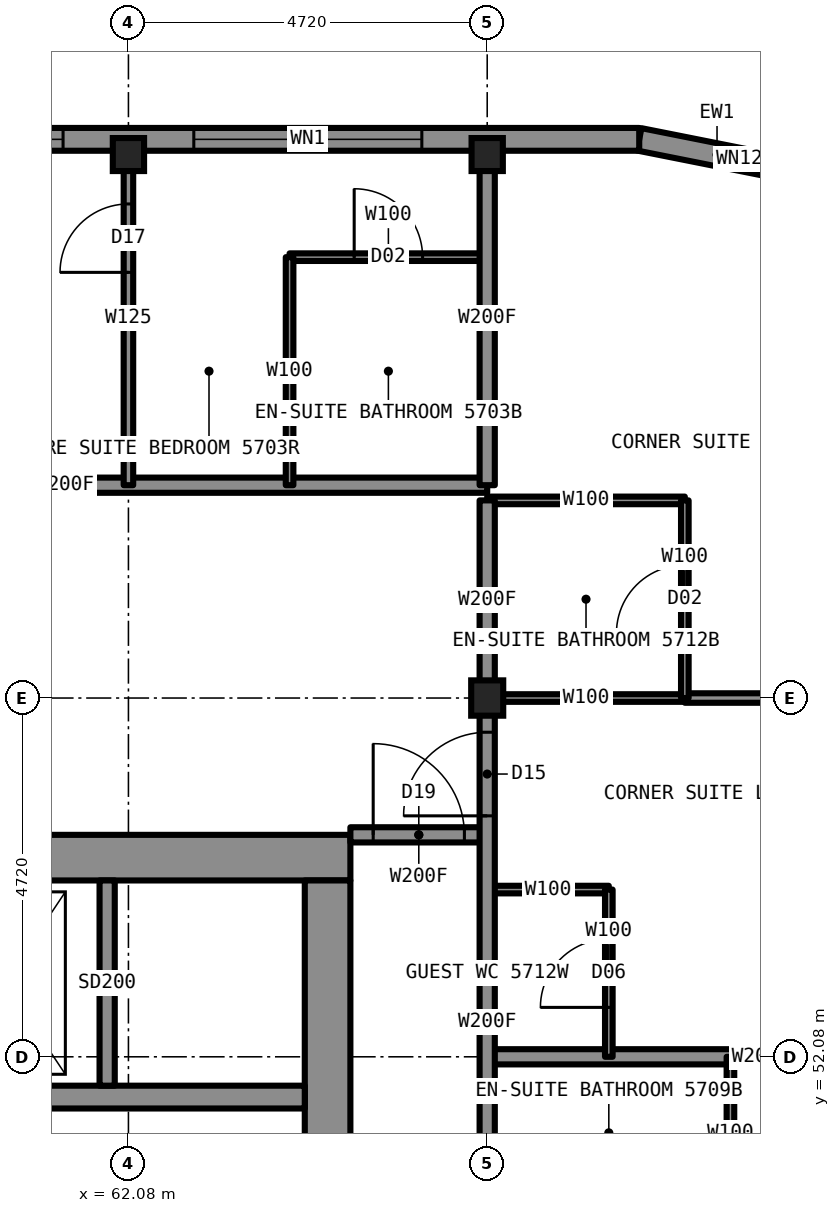
"""IFC4 building model, lengths in metres.
Left out: names, types, materials, properties, quantities, classifications, styles, units other than length and angle.
Written with IfcOpenShell. Run it as: python <this file> out.ifc"""

import sys

from ifc_helpers import new_model, si_unit, direction, frame, frame_2d, origin, origin_2d, place, context, subcontext, project, spatial, rectangle, i_section, extrude, element, fill, save


model = new_model("IFC4")
c1 = context("Model", 3, precision=1e-05, world=origin(), true_north=direction((0.0, 1.0)))
c2 = subcontext(c1, "Body", "Model", "MODEL_VIEW")
j1 = project(units=[si_unit("LENGTHUNIT", "METRE"), si_unit("PLANEANGLEUNIT", "RADIAN")], contexts=[c1])
p1 = place(None, origin())
s1 = spatial("IfcSite", under=j1, at=p1, CompositionType="ELEMENT")
p2 = place(p1, origin())
s2 = spatial("IfcBuilding", under=s1, at=p2, CompositionType="ELEMENT")
p3 = place(p2, frame((0.0, 0.0, 203.8)))
s3 = spatial("IfcBuildingStorey", under=s2, at=p3, CompositionType="ELEMENT", Elevation=203.8)
for number, where, z_axis, x_axis in (
    (1, (62.08, 63.95, 0.0), (0.0, 0.0, 1.0), (1.0, 0.0, 0.0)),
    (2, (66.8, 63.95, 0.0), (0.0, 0.0, 1.0), (1.0, 0.0, 0.0)),
):
    element("IfcColumn", number, at=place(p3, frame(where, z_axis=z_axis, x_axis=x_axis)), inside=s3, PredefinedType="COLUMN", context=c2, shape_type="SweptSolid", body=[
        extrude(i_section(OverallWidth=0.411, OverallDepth=0.434, WebThickness=0.036, FlangeThickness=0.057, at=origin_2d()), origin(), (0.0, 0.0, 1.0), 3.5),
    ])
p4 = place(p3, frame((66.8, 56.8, 0.0), z_axis=(0.0, 0.0, 1.0), x_axis=(1.0, 0.0, 0.0)))
e3 = element("IfcColumn", 3, at=p4, inside=s3, PredefinedType="COLUMN", context=c2, shape_type="SweptSolid", body=[
    extrude(i_section(OverallWidth=0.422, OverallDepth=0.465, WebThickness=0.045, FlangeThickness=0.073, at=origin_2d()), origin(), (0.0, 0.0, 1.0), 3.5),
])
p5 = place(p3, frame((45.0, 54.7, 0.0), z_axis=(0.0, 0.0, 1.0), x_axis=(1.0, 0.0, 0.0)))
e4 = element("IfcWall", 4, at=p5, inside=s3, PredefinedType="SHEAR", context=c2, shape_type="SweptSolid", body=[
    extrude(rectangle(XDim=20.0, YDim=0.6, at=frame_2d((10.0, 0.0))), origin(), (0.0, 0.0, 1.0), 3.5),
])
p6 = place(p3, frame((64.7, 35.6, 0.0), z_axis=(0.0, 0.0, 1.0), x_axis=(0.0, 1.0, 0.0)))
e5 = element("IfcWall", 5, at=p6, inside=s3, PredefinedType="SHEAR", context=c2, shape_type="SweptSolid", body=[
    extrude(rectangle(XDim=18.8, YDim=0.6, at=frame_2d((9.4, 0.0))), origin(), (0.0, 0.0, 1.0), 3.5),
])
p7 = place(p6, frame((13.4, 0.0, 0.0)))
e6 = element("IfcOpeningElement", 6, at=p7, cuts=e5, PredefinedType="OPENING", context=c2, shape_type="SweptSolid", body=[
    extrude(rectangle(XDim=1.8, YDim=2.2, at=frame_2d((0.9, 1.1))), frame((0.0, 0.31, 0.0), z_axis=(0.0, -1.0, 0.0), x_axis=(1.0, 0.0, 0.0)), (0.0, 0.0, 1.0), 0.62),
])
p8 = place(p6, frame((3.6, 0.0, 0.0)))
e7 = element("IfcOpeningElement", 7, at=p8, cuts=e5, PredefinedType="OPENING", context=c2, shape_type="SweptSolid", body=[
    extrude(rectangle(XDim=1.8, YDim=2.2, at=frame_2d((0.9, 1.1))), frame((0.0, 0.31, 0.0), z_axis=(0.0, -1.0, 0.0), x_axis=(1.0, 0.0, 0.0)), (0.0, 0.0, 1.0), 0.62),
])
p9 = place(p3, frame((45.6, 51.55, 0.0), z_axis=(0.0, 0.0, 1.0), x_axis=(1.0, 0.0, 0.0)))
e8 = element("IfcWall", 8, at=p9, inside=s3, PredefinedType="SHEAR", context=c2, shape_type="SweptSolid", body=[
    extrude(rectangle(XDim=18.8, YDim=0.3, at=frame_2d((9.4, 0.0))), origin(), (0.0, 0.0, 1.0), 3.5),
])
p10 = place(p9, frame((4.8, 0.0, 0.0)))
e9 = element("IfcOpeningElement", 9, at=p10, cuts=e8, PredefinedType="OPENING", context=c2, shape_type="SweptSolid", body=[
    extrude(rectangle(XDim=1.0, YDim=2.1, at=frame_2d((0.5, 1.05))), frame((0.0, 0.16, 0.0), z_axis=(0.0, -1.0, 0.0), x_axis=(1.0, 0.0, 0.0)), (0.0, 0.0, 1.0), 0.32),
])
p11 = place(p9, frame((11.6, 0.0, 0.0)))
e10 = element("IfcOpeningElement", 10, at=p11, cuts=e8, PredefinedType="OPENING", context=c2, shape_type="SweptSolid", body=[
    extrude(rectangle(XDim=1.1, YDim=2.2, at=frame_2d((0.55, 1.1))), frame((0.0, 0.16, 0.0), z_axis=(0.0, -1.0, 0.0), x_axis=(1.0, 0.0, 0.0)), (0.0, 0.0, 1.0), 0.32),
])
p12 = place(p9, frame((14.3, 0.0, 0.0)))
e11 = element("IfcOpeningElement", 11, at=p12, cuts=e8, PredefinedType="OPENING", context=c2, shape_type="SweptSolid", body=[
    extrude(rectangle(XDim=1.1, YDim=2.2, at=frame_2d((0.55, 1.1))), frame((0.0, 0.16, 0.0), z_axis=(0.0, -1.0, 0.0), x_axis=(1.0, 0.0, 0.0)), (0.0, 0.0, 1.0), 0.32),
])
p13 = place(p3, frame((65.0, 55.0, 0.0), z_axis=(0.0, 0.0, 1.0), x_axis=(1.0, 0.0, 0.0)))
e12 = element("IfcWall", 12, at=p13, inside=s3, PredefinedType="PARTITIONING", context=c2, shape_type="SweptSolid", body=[
    extrude(rectangle(XDim=1.8, YDim=0.2, at=frame_2d((0.9, 0.0))), origin(), (0.0, 0.0, 1.0), 3.33),
])
p14 = place(p13, frame((0.3, 0.0, 0.0)))
e13 = element("IfcOpeningElement", 13, at=p14, cuts=e12, PredefinedType="OPENING", context=c2, shape_type="SweptSolid", body=[
    extrude(rectangle(XDim=1.2, YDim=2.2, at=frame_2d((0.6, 1.1))), frame((0.0, 0.11, 0.0), z_axis=(0.0, -1.0, 0.0), x_axis=(1.0, 0.0, 0.0)), (0.0, 0.0, 1.0), 0.22),
])
p15 = place(p3, frame((66.8, 56.8, 0.0), z_axis=(0.0, 0.0, 1.0), x_axis=(1.0, 0.0, 0.0)))
e14 = element("IfcWall", 14, at=p15, inside=s3, PredefinedType="PARTITIONING", context=c2, shape_type="SweptSolid", body=[
    extrude(rectangle(XDim=2.6, YDim=0.1, at=frame_2d((1.3, 0.0))), origin(), (0.0, 0.0, 1.0), 2.573),
])
p16 = place(p3, frame((69.4, 56.8, 0.0), z_axis=(0.0, 0.0, 1.0), x_axis=(1.0, 0.0, 0.0)))
e15 = element("IfcWall", 15, at=p16, inside=s3, PredefinedType="PARTITIONING", context=c2, shape_type="SweptSolid", body=[
    extrude(rectangle(XDim=4.6, YDim=0.125, at=frame_2d((2.3, 0.0))), origin(), (0.0, 0.0, 1.0), 2.573),
])
p17 = place(p16, frame((1.15, 0.0, 0.0)))
e16 = element("IfcOpeningElement", 16, at=p17, cuts=e15, PredefinedType="OPENING", context=c2, shape_type="SweptSolid", body=[
    extrude(rectangle(XDim=0.9, YDim=2.2, at=frame_2d((0.45, 1.1))), frame((0.0, 0.073, 0.0), z_axis=(0.0, -1.0, 0.0), x_axis=(1.0, 0.0, 0.0)), (0.0, 0.0, 1.0), 0.145),
])
p18 = place(p3, frame((66.8, 59.4, 0.0), z_axis=(0.0, 0.0, 1.0), x_axis=(1.0, 0.0, 0.0)))
e17 = element("IfcWall", 17, at=p18, inside=s3, PredefinedType="PARTITIONING", context=c2, shape_type="SweptSolid", body=[
    extrude(rectangle(XDim=2.6, YDim=0.1, at=frame_2d((1.3, 0.0))), origin(), (0.0, 0.0, 1.0), 3.33),
])
p19 = place(p3, frame((43.2, 59.6, 0.0), z_axis=(0.0, 0.0, 1.0), x_axis=(1.0, 0.0, 0.0)))
e18 = element("IfcWall", 18, at=p19, inside=s3, PredefinedType="PARTITIONING", context=c2, shape_type="SweptSolid", body=[
    extrude(rectangle(XDim=23.6, YDim=0.2, at=frame_2d((11.8, 0.0))), origin(), (0.0, 0.0, 1.0), 3.33),
])
p20 = place(p19, frame((1.46, 0.0, 0.0)))
e19 = element("IfcOpeningElement", 19, at=p20, cuts=e18, PredefinedType="OPENING", context=c2, shape_type="SweptSolid", body=[
    extrude(rectangle(XDim=1.0, YDim=2.2, at=frame_2d((0.5, 1.1))), frame((0.0, 0.11, 0.0), z_axis=(0.0, -1.0, 0.0), x_axis=(1.0, 0.0, 0.0)), (0.0, 0.0, 1.0), 0.22),
])
p21 = place(p19, frame((6.18, 0.0, 0.0)))
e20 = element("IfcOpeningElement", 20, at=p21, cuts=e18, PredefinedType="OPENING", context=c2, shape_type="SweptSolid", body=[
    extrude(rectangle(XDim=1.0, YDim=2.2, at=frame_2d((0.5, 1.1))), frame((0.0, 0.11, 0.0), z_axis=(0.0, -1.0, 0.0), x_axis=(1.0, 0.0, 0.0)), (0.0, 0.0, 1.0), 0.22),
])
p22 = place(p19, frame((11.29, 0.0, 0.0)))
e21 = element("IfcOpeningElement", 21, at=p22, cuts=e18, PredefinedType="OPENING", context=c2, shape_type="SweptSolid", body=[
    extrude(rectangle(XDim=1.1, YDim=2.2, at=frame_2d((0.55, 1.1))), frame((0.0, 0.11, 0.0), z_axis=(0.0, -1.0, 0.0), x_axis=(1.0, 0.0, 0.0)), (0.0, 0.0, 1.0), 0.22),
])
p23 = place(p3, frame((64.2, 62.6, 0.0), z_axis=(0.0, 0.0, 1.0), x_axis=(1.0, 0.0, 0.0)))
e22 = element("IfcWall", 22, at=p23, inside=s3, PredefinedType="PARTITIONING", context=c2, shape_type="SweptSolid", body=[
    extrude(rectangle(XDim=2.6, YDim=0.1, at=frame_2d((1.3, 0.0))), origin(), (0.0, 0.0, 1.0), 3.33),
])
p24 = place(p23, frame((0.85, 0.0, 0.0)))
e23 = element("IfcOpeningElement", 23, at=p24, cuts=e22, PredefinedType="OPENING", context=c2, shape_type="SweptSolid", body=[
    extrude(rectangle(XDim=0.9, YDim=2.1, at=frame_2d((0.45, 1.05))), frame((0.0, 0.06, 0.0), z_axis=(0.0, -1.0, 0.0), x_axis=(1.0, 0.0, 0.0)), (0.0, 0.0, 1.0), 0.12),
])
p25 = place(p3, frame((66.8, 52.08, 0.0), z_axis=(0.0, 0.0, 1.0), x_axis=(1.0, 0.0, 0.0)))
e24 = element("IfcWall", 24, at=p25, inside=s3, PredefinedType="PARTITIONING", context=c2, shape_type="SweptSolid", body=[
    extrude(rectangle(XDim=7.2, YDim=0.2, at=frame_2d((3.6, 0.0))), origin(), (0.0, 0.0, 1.0), 2.573),
])
p26 = place(p3, frame((66.8, 54.28, 0.0), z_axis=(0.0, 0.0, 1.0), x_axis=(1.0, 0.0, 0.0)))
e25 = element("IfcWall", 25, at=p26, inside=s3, PredefinedType="PARTITIONING", context=c2, shape_type="SweptSolid", body=[
    extrude(rectangle(XDim=1.6, YDim=0.1, at=frame_2d((0.8, 0.0))), origin(), (0.0, 0.0, 1.0), 3.33),
])
p27 = place(p3, frame((66.8, 33.2, 0.0), z_axis=(0.0, 0.0, 1.0), x_axis=(0.0, 1.0, 0.0)))
e26 = element("IfcWall", 26, at=p27, inside=s3, PredefinedType="PARTITIONING", context=c2, shape_type="SweptSolid", body=[
    extrude(rectangle(XDim=23.58, YDim=0.2, at=frame_2d((11.79, 0.0))), origin(), (0.0, 0.0, 1.0), 3.33),
])
p28 = place(p27, frame((6.98, 0.0, 0.0)))
e27 = element("IfcOpeningElement", 27, at=p28, cuts=e26, PredefinedType="OPENING", context=c2, shape_type="SweptSolid", body=[
    extrude(rectangle(XDim=1.0, YDim=2.2, at=frame_2d((0.5, 1.1))), frame((0.0, 0.11, 0.0), z_axis=(0.0, -1.0, 0.0), x_axis=(1.0, 0.0, 0.0)), (0.0, 0.0, 1.0), 0.22),
])
p29 = place(p27, frame((11.7, 0.0, 0.0)))
e28 = element("IfcOpeningElement", 28, at=p29, cuts=e26, PredefinedType="OPENING", context=c2, shape_type="SweptSolid", body=[
    extrude(rectangle(XDim=1.0, YDim=2.2, at=frame_2d((0.5, 1.1))), frame((0.0, 0.11, 0.0), z_axis=(0.0, -1.0, 0.0), x_axis=(1.0, 0.0, 0.0)), (0.0, 0.0, 1.0), 0.22),
])
p30 = place(p27, frame((15.62, 0.0, 0.0)))
e29 = element("IfcOpeningElement", 29, at=p30, cuts=e26, PredefinedType="OPENING", context=c2, shape_type="SweptSolid", body=[
    extrude(rectangle(XDim=1.0, YDim=2.2, at=frame_2d((0.5, 1.1))), frame((0.0, 0.11, 0.0), z_axis=(0.0, -1.0, 0.0), x_axis=(1.0, 0.0, 0.0)), (0.0, 0.0, 1.0), 0.22),
])
p31 = place(p27, frame((22.05, 0.0, 0.0)))
e30 = element("IfcOpeningElement", 30, at=p31, cuts=e26, PredefinedType="OPENING", context=c2, shape_type="SweptSolid", body=[
    extrude(rectangle(XDim=1.1, YDim=2.2, at=frame_2d((0.55, 1.1))), frame((0.0, 0.11, 0.0), z_axis=(0.0, -1.0, 0.0), x_axis=(1.0, 0.0, 0.0)), (0.0, 0.0, 1.0), 0.22),
])
p32 = place(p27, frame((0.65, 0.0, 0.0)))
e31 = element("IfcOpeningElement", 31, at=p32, cuts=e26, PredefinedType="OPENING", context=c2, shape_type="SweptSolid", body=[
    extrude(rectangle(XDim=1.1, YDim=2.2, at=frame_2d((0.55, 1.1))), frame((0.0, 0.11, 0.0), z_axis=(0.0, -1.0, 0.0), x_axis=(1.0, 0.0, 0.0)), (0.0, 0.0, 1.0), 0.22),
])
p33 = place(p3, frame((66.8, 59.6, 0.0), z_axis=(0.0, 0.0, 1.0), x_axis=(0.0, 1.0, 0.0)))
e32 = element("IfcWall", 32, at=p33, inside=s3, PredefinedType="PARTITIONING", context=c2, shape_type="SweptSolid", body=[
    extrude(rectangle(XDim=4.4, YDim=0.2, at=frame_2d((2.2, 0.0))), origin(), (0.0, 0.0, 1.0), 2.573),
])
p34 = place(p3, frame((68.4, 52.08, 0.0), z_axis=(0.0, 0.0, 1.0), x_axis=(0.0, 1.0, 0.0)))
e33 = element("IfcWall", 33, at=p34, inside=s3, PredefinedType="PARTITIONING", context=c2, shape_type="SweptSolid", body=[
    extrude(rectangle(XDim=2.2, YDim=0.1, at=frame_2d((1.1, 0.0))), origin(), (0.0, 0.0, 1.0), 3.33),
])
p35 = place(p34, frame((0.65, 0.0, 0.0)))
e34 = element("IfcOpeningElement", 34, at=p35, cuts=e33, PredefinedType="OPENING", context=c2, shape_type="SweptSolid", body=[
    extrude(rectangle(XDim=0.9, YDim=2.1, at=frame_2d((0.45, 1.05))), frame((0.0, 0.06, 0.0), z_axis=(0.0, -1.0, 0.0), x_axis=(1.0, 0.0, 0.0)), (0.0, 0.0, 1.0), 0.12),
])
p36 = place(p3, frame((69.4, 56.8, 0.0), z_axis=(0.0, 0.0, 1.0), x_axis=(0.0, 1.0, 0.0)))
e35 = element("IfcWall", 35, at=p36, inside=s3, PredefinedType="PARTITIONING", context=c2, shape_type="SweptSolid", body=[
    extrude(rectangle(XDim=2.6, YDim=0.1, at=frame_2d((1.3, 0.0))), origin(), (0.0, 0.0, 1.0), 3.33),
])
p37 = place(p36, frame((0.85, 0.0, 0.0)))
e36 = element("IfcOpeningElement", 36, at=p37, cuts=e35, PredefinedType="OPENING", context=c2, shape_type="SweptSolid", body=[
    extrude(rectangle(XDim=0.9, YDim=2.1, at=frame_2d((0.45, 1.05))), frame((0.0, 0.06, 0.0), z_axis=(0.0, -1.0, 0.0), x_axis=(1.0, 0.0, 0.0)), (0.0, 0.0, 1.0), 0.12),
])
p38 = place(p3, frame((70.0, 50.08, 0.0), z_axis=(0.0, 0.0, 1.0), x_axis=(0.0, 1.0, 0.0)))
e37 = element("IfcWall", 37, at=p38, inside=s3, PredefinedType="PARTITIONING", context=c2, shape_type="SweptSolid", body=[
    extrude(rectangle(XDim=2.0, YDim=0.1, at=frame_2d((1.0, 0.0))), origin(), (0.0, 0.0, 1.0), 3.33),
])
p39 = place(p3, frame((62.08, 59.6, 0.0), z_axis=(0.0, 0.0, 1.0), x_axis=(0.0, 1.0, 0.0)))
e38 = element("IfcWall", 38, at=p39, inside=s3, PredefinedType="PARTITIONING", context=c2, shape_type="SweptSolid", body=[
    extrude(rectangle(XDim=4.4, YDim=0.125, at=frame_2d((2.2, 0.0))), origin(), (0.0, 0.0, 1.0), 2.573),
])
p40 = place(p39, frame((2.8, 0.0, 0.0)))
e39 = element("IfcOpeningElement", 39, at=p40, cuts=e38, PredefinedType="OPENING", context=c2, shape_type="SweptSolid", body=[
    extrude(rectangle(XDim=0.9, YDim=2.2, at=frame_2d((0.45, 1.1))), frame((0.0, 0.073, 0.0), z_axis=(0.0, -1.0, 0.0), x_axis=(1.0, 0.0, 0.0)), (0.0, 0.0, 1.0), 0.145),
])
p41 = place(p3, frame((64.2, 59.6, 0.0), z_axis=(0.0, 0.0, 1.0), x_axis=(0.0, 1.0, 0.0)))
e40 = element("IfcWall", 40, at=p41, inside=s3, PredefinedType="PARTITIONING", context=c2, shape_type="SweptSolid", body=[
    extrude(rectangle(XDim=3.0, YDim=0.1, at=frame_2d((1.5, 0.0))), origin(), (0.0, 0.0, 1.0), 3.33),
])
p42 = place(p3, frame((70.847, 63.743, 0.0), z_axis=(0.0, 0.0, 1.0), x_axis=(-0.980787050784, 0.195081421501, 0.0)))
e41 = element("IfcWall", 41, at=p42, inside=s3, PredefinedType="SOLIDWALL", context=c2, shape_type="SweptSolid", body=[
    extrude(rectangle(XDim=2.087, YDim=0.3, at=frame_2d((1.044, 0.0))), origin(), (0.0, 0.0, 1.0), 3.33),
])
p43 = place(p42, frame((0.444, 0.0, 0.3)))
e42 = element("IfcOpeningElement", 42, at=p43, cuts=e41, PredefinedType="OPENING", context=c2, shape_type="SweptSolid", body=[
    extrude(rectangle(XDim=1.2, YDim=2.0, at=frame_2d((0.6, 1.0))), frame((0.0, 0.16, 0.0), z_axis=(0.0, -1.0, 0.0), x_axis=(1.0, 0.0, 0.0)), (0.0, 0.0, 1.0), 0.32),
])
p44 = place(p3, frame((68.8, 64.15, 0.0), z_axis=(0.0, 0.0, 1.0), x_axis=(-1.0, 0.0, 0.0)))
e43 = element("IfcWall", 43, at=p44, inside=s3, PredefinedType="SOLIDWALL", context=c2, shape_type="SweptSolid", body=[
    extrude(rectangle(XDim=27.6, YDim=0.3, at=frame_2d((13.8, 0.0))), origin(), (0.0, 0.0, 1.0), 2.83),
])
p45 = place(p44, frame((2.86, 0.0, 0.3)))
e44 = element("IfcOpeningElement", 44, at=p45, cuts=e43, PredefinedType="OPENING", context=c2, shape_type="SweptSolid", body=[
    extrude(rectangle(XDim=0.7, YDim=1.2, at=frame_2d((0.35, 0.6))), frame((0.0, 0.16, 0.0), z_axis=(0.0, -1.0, 0.0), x_axis=(1.0, 0.0, 0.0)), (0.0, 0.0, 1.0), 0.32),
])
p46 = place(p44, frame((7.58, 0.0, 0.3)))
e45 = element("IfcOpeningElement", 45, at=p46, cuts=e43, PredefinedType="OPENING", context=c2, shape_type="SweptSolid", body=[
    extrude(rectangle(XDim=3.0, YDim=2.0, at=frame_2d((1.5, 1.0))), frame((0.0, 0.16, 0.0), z_axis=(0.0, -1.0, 0.0), x_axis=(1.0, 0.0, 0.0)), (0.0, 0.0, 1.0), 0.32),
])
p47 = place(p44, frame((12.3, 0.0, 0.3)))
e46 = element("IfcOpeningElement", 46, at=p47, cuts=e43, PredefinedType="OPENING", context=c2, shape_type="SweptSolid", body=[
    extrude(rectangle(XDim=3.0, YDim=2.0, at=frame_2d((1.5, 1.0))), frame((0.0, 0.16, 0.0), z_axis=(0.0, -1.0, 0.0), x_axis=(1.0, 0.0, 0.0)), (0.0, 0.0, 1.0), 0.32),
])
p48 = place(p44, frame((17.02, 0.0, 0.3)))
e47 = element("IfcOpeningElement", 47, at=p48, cuts=e43, PredefinedType="OPENING", context=c2, shape_type="SweptSolid", body=[
    extrude(rectangle(XDim=3.0, YDim=2.0, at=frame_2d((1.5, 1.0))), frame((0.0, 0.16, 0.0), z_axis=(0.0, -1.0, 0.0), x_axis=(1.0, 0.0, 0.0)), (0.0, 0.0, 1.0), 0.32),
])
p49 = place(p44, frame((23.99, 0.0, 0.3)))
e48 = element("IfcOpeningElement", 48, at=p49, cuts=e43, PredefinedType="OPENING", context=c2, shape_type="SweptSolid", body=[
    extrude(rectangle(XDim=0.7, YDim=1.2, at=frame_2d((0.35, 0.6))), frame((0.0, 0.16, 0.0), z_axis=(0.0, -1.0, 0.0), x_axis=(1.0, 0.0, 0.0)), (0.0, 0.0, 1.0), 0.32),
])
p50 = place(p3, frame((61.8, 51.7, 0.0), z_axis=(0.0, 0.0, 1.0), x_axis=(0.0, 1.0, 0.0)))
e49 = element("IfcWall", 49, at=p50, inside=s3, PredefinedType="PARTITIONING", context=c2, shape_type="SweptSolid", body=[
    extrude(rectangle(XDim=2.7, YDim=0.2, at=frame_2d((1.35, 0.0))), origin(), (0.0, 0.0, 1.0), 3.33),
])
p51 = place(p3, frame((66.8, 56.78, 0.0), z_axis=(0.0, 0.0, 1.0), x_axis=(0.0, 1.0, 0.0)))
e50 = element("IfcWall", 50, at=p51, inside=s3, PredefinedType="PARTITIONING", context=c2, shape_type="SweptSolid", body=[
    extrude(rectangle(XDim=2.62, YDim=0.2, at=frame_2d((1.31, 0.0))), origin(), (0.0, 0.0, 1.0), 2.573),
])
p52 = place(p14, origin())
e51 = element("IfcDoor", 51, at=p52, inside=s3, OperationType="SINGLE_SWING_LEFT", PredefinedType="DOOR", context=c2, shape_type="SweptSolid", body=[
    extrude(rectangle(XDim=1.2, YDim=2.2, at=frame_2d((0.6, 1.1))), frame((0.0, 0.025, 0.0), z_axis=(0.0, -1.0, 0.0), x_axis=(1.0, 0.0, 0.0)), (0.0, 0.0, 1.0), 0.05),
])
fill(e13, e51)
p53 = place(p24, origin())
e52 = element("IfcDoor", 52, at=p53, inside=s3, OperationType="SINGLE_SWING_RIGHT", PredefinedType="DOOR", context=c2, shape_type="SweptSolid", body=[
    extrude(rectangle(XDim=0.9, YDim=2.1, at=frame_2d((0.45, 1.05))), frame((0.0, 0.025, 0.0), z_axis=(0.0, -1.0, 0.0), x_axis=(1.0, 0.0, 0.0)), (0.0, 0.0, 1.0), 0.05),
])
fill(e23, e52)
p54 = place(p40, origin())
e53 = element("IfcDoor", 53, at=p54, inside=s3, OperationType="SINGLE_SWING_LEFT", PredefinedType="DOOR", context=c2, shape_type="SweptSolid", body=[
    extrude(rectangle(XDim=0.9, YDim=2.2, at=frame_2d((0.45, 1.1))), frame((0.0, 0.025, 0.0), z_axis=(0.0, -1.0, 0.0), x_axis=(1.0, 0.0, 0.0)), (0.0, 0.0, 1.0), 0.05),
])
fill(e39, e53)
p55 = place(p31, origin())
e54 = element("IfcDoor", 54, at=p55, inside=s3, OperationType="SINGLE_SWING_LEFT", PredefinedType="DOOR", context=c2, shape_type="SweptSolid", body=[
    extrude(rectangle(XDim=1.1, YDim=2.2, at=frame_2d((0.55, 1.1))), frame((0.0, 0.025, 0.0), z_axis=(0.0, -1.0, 0.0), x_axis=(1.0, 0.0, 0.0)), (0.0, 0.0, 1.0), 0.05),
])
fill(e30, e54)
p56 = place(p37, origin())
e55 = element("IfcDoor", 55, at=p56, inside=s3, OperationType="SINGLE_SWING_RIGHT", PredefinedType="DOOR", context=c2, shape_type="SweptSolid", body=[
    extrude(rectangle(XDim=0.9, YDim=2.1, at=frame_2d((0.45, 1.05))), frame((0.0, 0.025, 0.0), z_axis=(0.0, -1.0, 0.0), x_axis=(1.0, 0.0, 0.0)), (0.0, 0.0, 1.0), 0.05),
])
fill(e36, e55)
p57 = place(p35, origin())
e56 = element("IfcDoor", 56, at=p57, inside=s3, OperationType="SINGLE_SWING_LEFT", PredefinedType="DOOR", context=c2, shape_type="SweptSolid", body=[
    extrude(rectangle(XDim=0.9, YDim=2.1, at=frame_2d((0.45, 1.05))), frame((0.0, 0.025, 0.0), z_axis=(0.0, -1.0, 0.0), x_axis=(1.0, 0.0, 0.0)), (0.0, 0.0, 1.0), 0.05),
])
fill(e34, e56)
p58 = place(p43, origin())
e57 = element("IfcWindow", 57, at=p58, inside=s3, PartitioningType="SINGLE_PANEL", PredefinedType="WINDOW", context=c2, shape_type="SweptSolid", body=[
    extrude(rectangle(XDim=1.2, YDim=2.0, at=frame_2d((0.6, 1.0))), frame((0.0, 0.13, 0.0), z_axis=(0.0, -1.0, 0.0), x_axis=(1.0, 0.0, 0.0)), (0.0, 0.0, 1.0), 0.06),
])
fill(e42, e57)
p59 = place(p45, origin())
e58 = element("IfcWindow", 58, at=p59, inside=s3, PartitioningType="SINGLE_PANEL", PredefinedType="WINDOW", context=c2, shape_type="SweptSolid", body=[
    extrude(rectangle(XDim=0.7, YDim=1.2, at=frame_2d((0.35, 0.6))), frame((0.0, 0.13, 0.0), z_axis=(0.0, -1.0, 0.0), x_axis=(1.0, 0.0, 0.0)), (0.0, 0.0, 1.0), 0.06),
])
fill(e44, e58)
p60 = place(p46, origin())
e59 = element("IfcWindow", 59, at=p60, inside=s3, PartitioningType="SINGLE_PANEL", PredefinedType="WINDOW", context=c2, shape_type="SweptSolid", body=[
    extrude(rectangle(XDim=3.0, YDim=2.0, at=frame_2d((1.5, 1.0))), frame((0.0, 0.13, 0.0), z_axis=(0.0, -1.0, 0.0), x_axis=(1.0, 0.0, 0.0)), (0.0, 0.0, 1.0), 0.06),
])
fill(e45, e59)
save(model, sys.argv[1])
